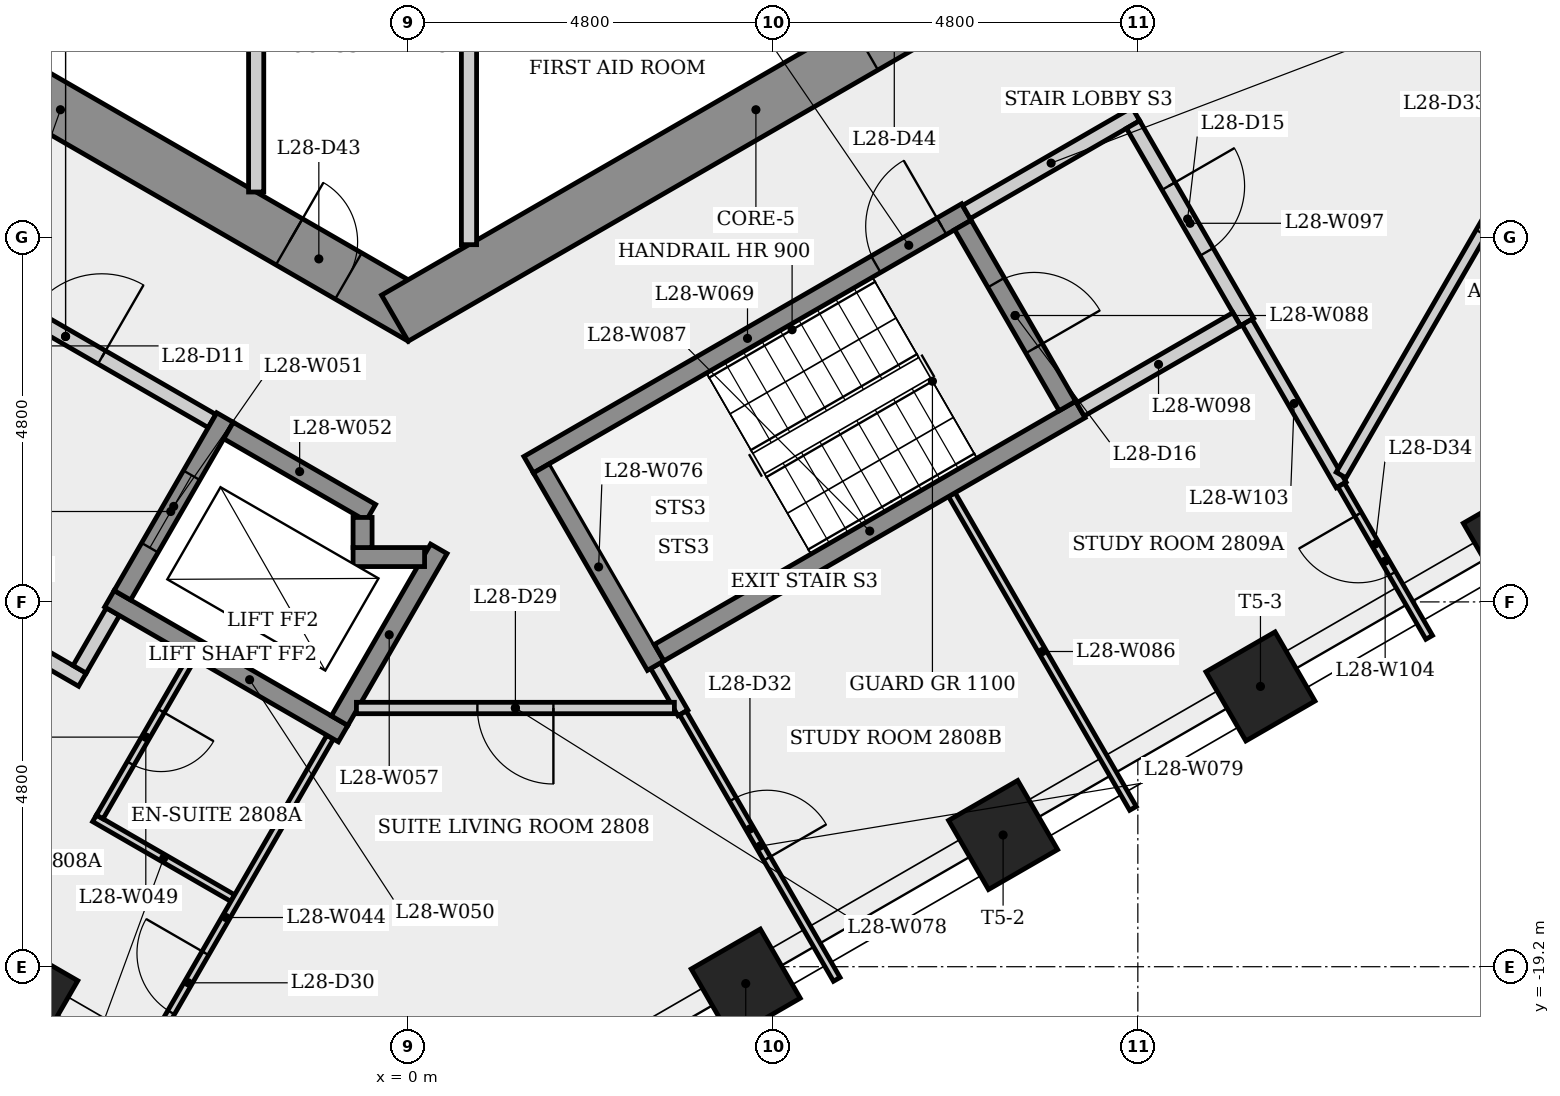
"""IFC4 building model, lengths in metres.
Left out: names, types, materials, properties, quantities, classifications, styles, units other than length and angle.
Written with IfcOpenShell. Run it as: python <this file> out.ifc"""

import sys

from ifc_helpers import new_model, si_unit, direction, frame, frame_2d, origin, origin_2d, place, context, subcontext, project, spatial, rectangle, extrude, element, fill, save


model = new_model("IFC4")
c1 = context("Model", 3, precision=1e-05, world=origin(), true_north=direction((0.0, 1.0)))
c2 = subcontext(c1, "Body", "Model", "MODEL_VIEW")
j1 = project(units=[si_unit("LENGTHUNIT", "METRE"), si_unit("PLANEANGLEUNIT", "RADIAN")], contexts=[c1])
p1 = place(None, origin())
s1 = spatial("IfcSite", under=j1, at=p1, CompositionType="ELEMENT")
p2 = place(p1, origin())
s2 = spatial("IfcBuilding", under=s1, at=p2, CompositionType="ELEMENT")
p3 = place(p2, frame((0.0, 0.0, 106.9)))
s3 = spatial("IfcBuildingStorey", under=s2, at=p3, CompositionType="ELEMENT", Elevation=106.9)
p4 = place(p3, frame((-9.325, -5.182, 0.0), z_axis=(0.0, 0.0, 1.0), x_axis=(0.866023993627, -0.500002442456, 0.0)))
e1 = element("IfcWall", 1, at=p4, inside=s3, PredefinedType="SHEAR", context=c2, shape_type="SweptSolid", body=[
    extrude(rectangle(XDim=10.97, YDim=0.7, at=frame_2d((5.485, 0.0))), origin(), (0.0, 0.0, 1.0), 3.4),
])
p5 = place(p4, frame((2.239, 0.0, 0.0)))
e2 = element("IfcOpeningElement", 2, at=p5, cuts=e1, PredefinedType="OPENING", context=c2, shape_type="SweptSolid", body=[
    extrude(rectangle(XDim=0.9, YDim=2.1, at=frame_2d((0.45, 1.05))), frame((0.0, 0.36, 0.0), z_axis=(0.0, -1.0, 0.0), x_axis=(1.0, 0.0, 0.0)), (0.0, 0.0, 1.0), 0.72),
])
p6 = place(p4, frame((8.96, 0.0, 0.0)))
e3 = element("IfcOpeningElement", 3, at=p6, cuts=e1, PredefinedType="OPENING", context=c2, shape_type="SweptSolid", body=[
    extrude(rectangle(XDim=0.9, YDim=2.1, at=frame_2d((0.45, 1.05))), frame((0.0, 0.36, 0.0), z_axis=(0.0, -1.0, 0.0), x_axis=(1.0, 0.0, 0.0)), (0.0, 0.0, 1.0), 0.72),
])
p7 = place(p3, frame((-0.175, -10.667, 0.0), z_axis=(0.0, 0.0, 1.0), x_axis=(0.866023993627, 0.500002442456, 0.0)))
e4 = element("IfcWall", 4, at=p7, inside=s3, PredefinedType="SHEAR", context=c2, shape_type="SweptSolid", body=[
    extrude(rectangle(XDim=10.97, YDim=0.7, at=frame_2d((5.485, 0.0))), origin(), (0.0, 0.0, 1.0), 3.4),
])
p8 = place(p7, frame((7.137, 0.0, 0.0)))
e5 = element("IfcOpeningElement", 5, at=p8, cuts=e4, PredefinedType="OPENING", context=c2, shape_type="SweptSolid", body=[
    extrude(rectangle(XDim=0.9, YDim=2.1, at=frame_2d((0.45, 1.05))), frame((0.0, 0.36, 0.0), z_axis=(0.0, -1.0, 0.0), x_axis=(1.0, 0.0, 0.0)), (0.0, 0.0, 1.0), 0.72),
])
for number, where, z_axis, x_axis in (
    (6, (-5.064, -19.576, 0.0), (0.0, 0.0, 1.0), (-0.5, -0.866, 0.0)),
    (7, (4.441, -19.422, 0.0), (0.0, 0.0, 1.0), (0.5, -0.866, 0.0)),
    (8, (7.827, -17.467, 0.0), (0.0, 0.0, 1.0), (0.5, -0.866, 0.0)),
    (9, (11.213, -15.512, 0.0), (0.0, 0.0, 1.0), (0.5, -0.866, 0.0)),
    (10, (14.599, -13.557, 0.0), (0.0, 0.0, 1.0), (0.5, -0.866, 0.0)),
):
    element("IfcColumn", number, at=place(p3, frame(where, z_axis=z_axis, x_axis=x_axis)), inside=s3, PredefinedType="COLUMN", context=c2, shape_type="SweptSolid", body=[
        extrude(rectangle(XDim=1.05, YDim=1.05, at=origin_2d()), origin(), (0.0, 0.0, 1.0), 3.4),
    ])
p9 = place(p3, frame((-6.435, -9.795, 0.0), z_axis=(0.0, 0.0, 1.0), x_axis=(0.866012907634, -0.500021643343, 0.0)))
e11 = element("IfcWall", 11, at=p9, inside=s3, PredefinedType="PARTITIONING", context=c2, shape_type="SweptSolid", body=[
    extrude(rectangle(XDim=4.45, YDim=0.2, at=frame_2d((2.225, 0.0))), origin(), (0.0, 0.0, 1.0), 3.05),
])
p10 = place(p9, frame((1.675, 0.0, 0.0)))
e12 = element("IfcOpeningElement", 12, at=p10, cuts=e11, PredefinedType="OPENING", context=c2, shape_type="SweptSolid", body=[
    extrude(rectangle(XDim=1.1, YDim=2.1, at=frame_2d((0.55, 1.05))), frame((0.0, 0.11, 0.0), z_axis=(0.0, -1.0, 0.0), x_axis=(1.0, 0.0, 0.0)), (0.0, 0.0, 1.0), 0.22),
])
p11 = place(p3, frame((-4.286, -15.423, 0.0), z_axis=(0.0, 0.0, 1.0), x_axis=(-0.866025371046, 0.500000056704, 0.0)))
e13 = element("IfcWall", 13, at=p11, inside=s3, PredefinedType="PARTITIONING", context=c2, shape_type="SweptSolid", body=[
    extrude(rectangle(XDim=1.7, YDim=0.2, at=frame_2d((0.85, 0.0))), origin(), (0.0, 0.0, 1.0), 3.05),
])
p12 = place(p3, frame((-4.127, -17.247, 0.0), z_axis=(0.0, 0.0, 1.0), x_axis=(0.866038466041, -0.499977374825, 0.0)))
e14 = element("IfcWall", 14, at=p12, inside=s3, PredefinedType="PARTITIONING", context=c2, shape_type="SweptSolid", body=[
    extrude(rectangle(XDim=2.1, YDim=0.1, at=frame_2d((1.05, 0.0))), origin(), (0.0, 0.0, 1.0), 3.05),
])
p13 = place(p3, frame((-3.885, -14.529, 0.0), z_axis=(0.0, 0.0, 1.0), x_axis=(-0.499859285417, -0.866106630146, 0.0)))
e15 = element("IfcWall", 15, at=p13, inside=s3, PredefinedType="PARTITIONING", context=c2, shape_type="SweptSolid", body=[
    extrude(rectangle(XDim=0.875, YDim=0.2, at=frame_2d((0.438, 0.0))), origin(), (0.0, 0.0, 1.0), 3.05),
])
p14 = place(p3, frame((-3.768, -20.926, 0.0), z_axis=(0.0, 0.0, 1.0), x_axis=(0.499980760091, 0.866036511666, 0.0)))
e16 = element("IfcWall", 16, at=p14, inside=s3, PredefinedType="PARTITIONING", context=c2, shape_type="SweptSolid", body=[
    extrude(rectangle(XDim=5.482, YDim=0.1, at=frame_2d((2.741, 0.0))), origin(), (0.0, 0.0, 1.0), 3.05),
])
p15 = place(p14, frame((1.299, 0.0, 0.0)))
e17 = element("IfcOpeningElement", 17, at=p15, cuts=e16, PredefinedType="OPENING", context=c2, shape_type="SweptSolid", body=[
    extrude(rectangle(XDim=0.9, YDim=2.1, at=frame_2d((0.45, 1.05))), frame((0.0, 0.06, 0.0), z_axis=(0.0, -1.0, 0.0), x_axis=(1.0, 0.0, 0.0)), (0.0, 0.0, 1.0), 0.12),
])
p16 = place(p3, frame((-2.846, -15.129, 0.0), z_axis=(0.0, 0.0, 1.0), x_axis=(-0.500047793048, -0.865997808697, 0.0)))
e18 = element("IfcWall", 18, at=p16, inside=s3, PredefinedType="PARTITIONING", context=c2, shape_type="SweptSolid", body=[
    extrude(rectangle(XDim=2.425, YDim=0.1, at=frame_2d((1.212, 0.0))), origin(), (0.0, 0.0, 1.0), 3.05),
])
p17 = place(p16, frame((0.812, 0.0, 0.0)))
e19 = element("IfcOpeningElement", 19, at=p17, cuts=e18, PredefinedType="OPENING", context=c2, shape_type="SweptSolid", body=[
    extrude(rectangle(XDim=0.8, YDim=2.1, at=frame_2d((0.4, 1.05))), frame((0.0, 0.06, 0.0), z_axis=(0.0, -1.0, 0.0), x_axis=(1.0, 0.0, 0.0)), (0.0, 0.0, 1.0), 0.12),
])
p18 = place(p3, frame((-3.931, -14.358, 0.0), z_axis=(0.0, 0.0, 1.0), x_axis=(0.8660424351, -0.499970499736, 0.0)))
e20 = element("IfcWall", 20, at=p18, inside=s3, PredefinedType="SHEAR", context=c2, shape_type="SweptSolid", body=[
    extrude(rectangle(XDim=3.55, YDim=0.25, at=frame_2d((1.775, 0.0))), origin(), (0.0, 0.0, 1.0), 3.05),
])
p19 = place(p3, frame((-2.41, -11.974, 0.0), z_axis=(0.0, 0.0, 1.0), x_axis=(-0.50000943426, -0.866019956843, 0.0)))
e21 = element("IfcWall", 21, at=p19, inside=s3, PredefinedType="SHEAR", context=c2, shape_type="SweptSolid", body=[
    extrude(rectangle(XDim=2.7, YDim=0.25, at=frame_2d((1.35, 0.0))), origin(), (0.0, 0.0, 1.0), 3.05),
])
p20 = place(p19, frame((0.877, 0.0, 0.0)))
e22 = element("IfcOpeningElement", 22, at=p20, cuts=e21, PredefinedType="OPENING", context=c2, shape_type="SweptSolid", body=[
    extrude(rectangle(XDim=1.1, YDim=2.1, at=frame_2d((0.55, 1.05))), frame((0.0, 0.135, 0.0), z_axis=(0.0, -1.0, 0.0), x_axis=(1.0, 0.0, 0.0)), (0.0, 0.0, 1.0), 0.27),
])
p21 = place(p3, frame((-2.364, -12.145, 0.0), z_axis=(0.0, 0.0, 1.0), x_axis=(0.86603892542, -0.499976579108, 0.0)))
e23 = element("IfcWall", 23, at=p21, inside=s3, PredefinedType="SHEAR", context=c2, shape_type="SweptSolid", body=[
    extrude(rectangle(XDim=2.162, YDim=0.25, at=frame_2d((1.081, 0.0))), origin(), (0.0, 0.0, 1.0), 3.05),
])
p22 = place(p3, frame((-2.0, -5.275, 0.0), z_axis=(0.0, 0.0, 1.0), x_axis=(0.0, -1.0, 0.0)))
e24 = element("IfcWall", 24, at=p22, inside=s3, PredefinedType="PARTITIONING", context=c2, shape_type="SweptSolid", body=[
    extrude(rectangle(XDim=3.732, YDim=0.2, at=frame_2d((1.866, 0.0))), origin(), (0.0, 0.0, 1.0), 3.05),
])
p23 = place(p3, frame((-0.902, -15.962, 0.0), z_axis=(0.0, 0.0, 1.0), x_axis=(0.499981517636, 0.866036074319, 0.0)))
e25 = element("IfcWall", 25, at=p23, inside=s3, PredefinedType="SHEAR", context=c2, shape_type="SweptSolid", body=[
    extrude(rectangle(XDim=2.61, YDim=0.25, at=frame_2d((1.305, 0.0))), origin(), (0.0, 0.0, 1.0), 3.05),
])
p24 = place(p3, frame((-0.725, -13.81, 0.0), z_axis=(0.0, 0.0, 1.0), x_axis=(1.0, 0.0, 0.0)))
e26 = element("IfcWall", 26, at=p24, inside=s3, PredefinedType="SHEAR", context=c2, shape_type="SweptSolid", body=[
    extrude(rectangle(XDim=0.941, YDim=0.25, at=frame_2d((0.47, 0.0))), origin(), (0.0, 0.0, 1.0), 3.4),
])
p25 = place(p3, frame((-0.6, -13.289, 0.0), z_axis=(0.0, 0.0, 1.0), x_axis=(0.0, -1.0, 0.0)))
e27 = element("IfcWall", 27, at=p25, inside=s3, PredefinedType="SHEAR", context=c2, shape_type="SweptSolid", body=[
    extrude(rectangle(XDim=0.396, YDim=0.25, at=frame_2d((0.198, 0.0))), origin(), (0.0, 0.0, 1.0), 3.4),
])
p26 = place(p3, frame((0.8, -5.275, 0.0), z_axis=(0.0, 0.0, 1.0), x_axis=(0.0, -1.0, 0.0)))
e28 = element("IfcWall", 28, at=p26, inside=s3, PredefinedType="PARTITIONING", context=c2, shape_type="SweptSolid", body=[
    extrude(rectangle(XDim=4.425, YDim=0.2, at=frame_2d((2.212, 0.0))), origin(), (0.0, 0.0, 1.0), 3.05),
])
p27 = place(p3, frame((1.585, -12.595, 0.0), z_axis=(0.0, 0.0, 1.0), x_axis=(0.866036417653, 0.499980922934, 0.0)))
e29 = element("IfcWall", 29, at=p27, inside=s3, PredefinedType="SHEAR", context=c2, shape_type="SweptSolid", body=[
    extrude(rectangle(XDim=6.65, YDim=0.25, at=frame_2d((3.325, 0.0))), origin(), (0.0, 0.0, 1.0), 3.05),
])
p28 = place(p27, frame((5.275, 0.0, 0.0)))
e30 = element("IfcOpeningElement", 30, at=p28, cuts=e29, PredefinedType="OPENING", context=c2, shape_type="SweptSolid", body=[
    extrude(rectangle(XDim=1.0, YDim=2.1, at=frame_2d((0.5, 1.05))), frame((0.0, 0.135, 0.0), z_axis=(0.0, -1.0, 0.0), x_axis=(1.0, 0.0, 0.0)), (0.0, 0.0, 1.0), 0.27),
])
p29 = place(p3, frame((3.256, -15.239, 0.0), z_axis=(0.0, 0.0, 1.0), x_axis=(0.499830307316, -0.866123353737, 0.0)))
e31 = element("IfcWall", 31, at=p29, inside=s3, PredefinedType="PARTITIONING", context=c2, shape_type="SweptSolid", body=[
    extrude(rectangle(XDim=0.719, YDim=0.15, at=frame_2d((0.359, 0.0))), origin(), (0.0, 0.0, 1.0), 3.05),
])
p30 = place(p3, frame((3.256, -15.239, 0.0), z_axis=(0.0, 0.0, 1.0), x_axis=(-0.50002537861, 0.866010750942, 0.0)))
e32 = element("IfcWall", 32, at=p30, inside=s3, PredefinedType="SHEAR", context=c2, shape_type="SweptSolid", body=[
    extrude(rectangle(XDim=3.0, YDim=0.25, at=frame_2d((1.5, 0.0))), origin(), (0.0, 0.0, 1.0), 3.05),
])
p31 = place(p3, frame((3.502, -15.796, 0.0), z_axis=(0.0, 0.0, 1.0), x_axis=(-1.0, 0.0, 0.0)))
e33 = element("IfcWall", 33, at=p31, inside=s3, PredefinedType="PARTITIONING", context=c2, shape_type="SweptSolid", body=[
    extrude(rectangle(XDim=4.183, YDim=0.15, at=frame_2d((2.092, 0.0))), origin(), (0.0, 0.0, 1.0), 3.05),
])
p32 = place(p31, frame((1.592, 0.0, 0.0)))
e34 = element("IfcOpeningElement", 34, at=p32, cuts=e33, PredefinedType="OPENING", context=c2, shape_type="SweptSolid", body=[
    extrude(rectangle(XDim=1.0, YDim=2.1, at=frame_2d((0.5, 1.05))), frame((0.0, 0.085, 0.0), z_axis=(0.0, -1.0, 0.0), x_axis=(1.0, 0.0, 0.0)), (0.0, 0.0, 1.0), 0.17),
])
p33 = place(p3, frame((3.615, -15.861, 0.0), z_axis=(0.0, 0.0, 1.0), x_axis=(0.500018313359, -0.866014830303, 0.0)))
e35 = element("IfcWall", 35, at=p33, inside=s3, PredefinedType="PARTITIONING", context=c2, shape_type="SweptSolid", body=[
    extrude(rectangle(XDim=4.048, YDim=0.1, at=frame_2d((2.024, 0.0))), origin(), (0.0, 0.0, 1.0), 3.05),
])
p34 = place(p33, frame((1.313, 0.0, 0.0)))
e36 = element("IfcOpeningElement", 36, at=p34, cuts=e35, PredefinedType="OPENING", context=c2, shape_type="SweptSolid", body=[
    extrude(rectangle(XDim=0.9, YDim=2.1, at=frame_2d((0.45, 1.05))), frame((0.0, 0.06, 0.0), z_axis=(0.0, -1.0, 0.0), x_axis=(1.0, 0.0, 0.0)), (0.0, 0.0, 1.0), 0.12),
])
p35 = place(p3, frame((7.153, -12.989, 0.0), z_axis=(0.0, 0.0, 1.0), x_axis=(0.500028389435, -0.866009012516, 0.0)))
e37 = element("IfcWall", 37, at=p35, inside=s3, PredefinedType="PARTITIONING", context=c2, shape_type="SweptSolid", body=[
    extrude(rectangle(XDim=4.766, YDim=0.1, at=frame_2d((2.383, 0.0))), origin(), (0.0, 0.0, 1.0), 3.05),
])
p36 = place(p3, frame((3.301, -15.068, 0.0), z_axis=(0.0, 0.0, 1.0), x_axis=(0.866035036182, 0.499983315828, 0.0)))
e38 = element("IfcWall", 38, at=p36, inside=s3, PredefinedType="SHEAR", context=c2, shape_type="SweptSolid", body=[
    extrude(rectangle(XDim=6.4, YDim=0.25, at=frame_2d((3.2, 0.0))), origin(), (0.0, 0.0, 1.0), 3.05),
])
p37 = place(p3, frame((7.298, -9.441, 0.0), z_axis=(0.0, 0.0, 1.0), x_axis=(0.500034990121, -0.866005201286, 0.0)))
e39 = element("IfcWall", 39, at=p37, inside=s3, PredefinedType="SHEAR", context=c2, shape_type="SweptSolid", body=[
    extrude(rectangle(XDim=2.75, YDim=0.25, at=frame_2d((1.375, 0.0))), origin(), (0.0, 0.0, 1.0), 3.05),
])
p38 = place(p37, frame((0.875, 0.0, 0.0)))
e40 = element("IfcOpeningElement", 40, at=p38, cuts=e39, PredefinedType="OPENING", context=c2, shape_type="SweptSolid", body=[
    extrude(rectangle(XDim=1.0, YDim=2.1, at=frame_2d((0.5, 1.05))), frame((0.0, 0.135, 0.0), z_axis=(0.0, -1.0, 0.0), x_axis=(1.0, 0.0, 0.0)), (0.0, 0.0, 1.0), 0.27),
])
p39 = place(p3, frame((7.344, -9.27, 0.0), z_axis=(0.0, 0.0, 1.0), x_axis=(0.866005588531, 0.500034319456, 0.0)))
e41 = element("IfcWall", 41, at=p39, inside=s3, PredefinedType="PARTITIONING", context=c2, shape_type="SweptSolid", body=[
    extrude(rectangle(XDim=2.575, YDim=0.2, at=frame_2d((1.288, 0.0))), origin(), (0.0, 0.0, 1.0), 3.05),
])
p40 = place(p3, frame((9.537, -8.119, 0.0), z_axis=(0.0, 0.0, 1.0), x_axis=(0.499990139034, -0.866031096941, 0.0)))
e42 = element("IfcWall", 42, at=p40, inside=s3, PredefinedType="PARTITIONING", context=c2, shape_type="SweptSolid", body=[
    extrude(rectangle(XDim=3.0, YDim=0.2, at=frame_2d((1.5, 0.0))), origin(), (0.0, 0.0, 1.0), 3.05),
])
p41 = place(p40, frame((0.935, 0.0, 0.0)))
e43 = element("IfcOpeningElement", 43, at=p41, cuts=e42, PredefinedType="OPENING", context=c2, shape_type="SweptSolid", body=[
    extrude(rectangle(XDim=1.0, YDim=2.1, at=frame_2d((0.5, 1.05))), frame((0.0, 0.11, 0.0), z_axis=(0.0, -1.0, 0.0), x_axis=(1.0, 0.0, 0.0)), (0.0, 0.0, 1.0), 0.22),
])
p42 = place(p3, frame((10.901, -10.681, 0.0), z_axis=(0.0, 0.0, 1.0), x_axis=(-0.866007538022, -0.500030943131, 0.0)))
e44 = element("IfcWall", 44, at=p42, inside=s3, PredefinedType="PARTITIONING", context=c2, shape_type="SweptSolid", body=[
    extrude(rectangle(XDim=2.375, YDim=0.2, at=frame_2d((1.188, 0.0))), origin(), (0.0, 0.0, 1.0), 3.05),
])
p43 = place(p3, frame((12.275, -12.861, 0.0), z_axis=(0.0, 0.0, 1.0), x_axis=(-0.499904577418, 0.866080489029, 0.0)))
e45 = element("IfcWall", 45, at=p43, inside=s3, PredefinedType="PARTITIONING", context=c2, shape_type="SweptSolid", body=[
    extrude(rectangle(XDim=2.476, YDim=0.15, at=frame_2d((1.238, 0.0))), origin(), (0.0, 0.0, 1.0), 3.05),
])
p44 = place(p3, frame((13.433, -14.866, 0.0), z_axis=(0.0, 0.0, 1.0), x_axis=(-0.500050991752, 0.865995961681, 0.0)))
e46 = element("IfcWall", 46, at=p44, inside=s3, PredefinedType="PARTITIONING", context=c2, shape_type="SweptSolid", body=[
    extrude(rectangle(XDim=2.316, YDim=0.1, at=frame_2d((1.158, 0.0))), origin(), (0.0, 0.0, 1.0), 3.05),
])
p45 = place(p44, frame((0.968, 0.0, 0.0)))
e47 = element("IfcOpeningElement", 47, at=p45, cuts=e46, PredefinedType="OPENING", context=c2, shape_type="SweptSolid", body=[
    extrude(rectangle(XDim=0.9, YDim=2.1, at=frame_2d((0.45, 1.05))), frame((0.0, 0.06, 0.0), z_axis=(0.0, -1.0, 0.0), x_axis=(1.0, 0.0, 0.0)), (0.0, 0.0, 1.0), 0.12),
])
p46 = place(p3, frame((16.457, -5.488, 0.0), z_axis=(0.0, 0.0, 1.0), x_axis=(-0.499991130599, -0.866030524475, 0.0)))
e48 = element("IfcWall", 48, at=p46, inside=s3, PredefinedType="PARTITIONING", context=c2, shape_type="SweptSolid", body=[
    extrude(rectangle(XDim=8.364, YDim=0.15, at=frame_2d((4.182, 0.0))), origin(), (0.0, 0.0, 1.0), 3.05),
])
p47 = place(p46, frame((3.682, 0.0, 0.0)))
e49 = element("IfcOpeningElement", 49, at=p47, cuts=e48, PredefinedType="OPENING", context=c2, shape_type="SweptSolid", body=[
    extrude(rectangle(XDim=1.0, YDim=2.1, at=frame_2d((0.5, 1.05))), frame((0.0, 0.085, 0.0), z_axis=(0.0, -1.0, 0.0), x_axis=(1.0, 0.0, 0.0)), (0.0, 0.0, 1.0), 0.17),
])
p48 = place(p10, origin())
e50 = element("IfcDoor", 50, at=p48, inside=s3, OperationType="SINGLE_SWING_RIGHT", PredefinedType="DOOR", context=c2, shape_type="SweptSolid", body=[
    extrude(rectangle(XDim=1.1, YDim=2.1, at=frame_2d((0.55, 1.05))), frame((0.0, 0.025, 0.0), z_axis=(0.0, -1.0, 0.0), x_axis=(1.0, 0.0, 0.0)), (0.0, 0.0, 1.0), 0.05),
])
fill(e12, e50)
p49 = place(p20, origin())
e51 = element("IfcDoor", 51, at=p49, inside=s3, OperationType="SLIDING_TO_LEFT", PredefinedType="DOOR", context=c2, shape_type="SweptSolid", body=[
    extrude(rectangle(XDim=1.1, YDim=2.1, at=frame_2d((0.55, 1.05))), frame((0.0, 0.025, 0.0), z_axis=(0.0, -1.0, 0.0), x_axis=(1.0, 0.0, 0.0)), (0.0, 0.0, 1.0), 0.05),
])
fill(e22, e51)
p50 = place(p28, origin())
e52 = element("IfcDoor", 52, at=p50, inside=s3, OperationType="SINGLE_SWING_RIGHT", PredefinedType="DOOR", context=c2, shape_type="SweptSolid", body=[
    extrude(rectangle(XDim=1.0, YDim=2.1, at=frame_2d((0.5, 1.05))), frame((0.0, 0.025, 0.0), z_axis=(0.0, -1.0, 0.0), x_axis=(1.0, 0.0, 0.0)), (0.0, 0.0, 1.0), 0.05),
])
fill(e30, e52)
p51 = place(p41, origin())
e53 = element("IfcDoor", 53, at=p51, inside=s3, OperationType="SINGLE_SWING_LEFT", PredefinedType="DOOR", context=c2, shape_type="SweptSolid", body=[
    extrude(rectangle(XDim=1.0, YDim=2.1, at=frame_2d((0.5, 1.05))), frame((0.0, 0.025, 0.0), z_axis=(0.0, -1.0, 0.0), x_axis=(1.0, 0.0, 0.0)), (0.0, 0.0, 1.0), 0.05),
])
fill(e43, e53)
p52 = place(p38, origin())
e54 = element("IfcDoor", 54, at=p52, inside=s3, OperationType="SINGLE_SWING_RIGHT", PredefinedType="DOOR", context=c2, shape_type="SweptSolid", body=[
    extrude(rectangle(XDim=1.0, YDim=2.1, at=frame_2d((0.5, 1.05))), frame((0.0, 0.025, 0.0), z_axis=(0.0, -1.0, 0.0), x_axis=(1.0, 0.0, 0.0)), (0.0, 0.0, 1.0), 0.05),
])
fill(e40, e54)
p53 = place(p32, origin())
e55 = element("IfcDoor", 55, at=p53, inside=s3, OperationType="SINGLE_SWING_LEFT", PredefinedType="DOOR", context=c2, shape_type="SweptSolid", body=[
    extrude(rectangle(XDim=1.0, YDim=2.1, at=frame_2d((0.5, 1.05))), frame((0.0, 0.025, 0.0), z_axis=(0.0, -1.0, 0.0), x_axis=(1.0, 0.0, 0.0)), (0.0, 0.0, 1.0), 0.05),
])
fill(e34, e55)
p54 = place(p15, origin())
e56 = element("IfcDoor", 56, at=p54, inside=s3, OperationType="SINGLE_SWING_RIGHT", PredefinedType="DOOR", context=c2, shape_type="SweptSolid", body=[
    extrude(rectangle(XDim=0.9, YDim=2.1, at=frame_2d((0.45, 1.05))), frame((0.0, 0.025, 0.0), z_axis=(0.0, -1.0, 0.0), x_axis=(1.0, 0.0, 0.0)), (0.0, 0.0, 1.0), 0.05),
])
fill(e17, e56)
p55 = place(p17, origin())
e57 = element("IfcDoor", 57, at=p55, inside=s3, OperationType="SINGLE_SWING_LEFT", PredefinedType="DOOR", context=c2, shape_type="SweptSolid", body=[
    extrude(rectangle(XDim=0.8, YDim=2.1, at=frame_2d((0.4, 1.05))), frame((0.0, 0.025, 0.0), z_axis=(0.0, -1.0, 0.0), x_axis=(1.0, 0.0, 0.0)), (0.0, 0.0, 1.0), 0.05),
])
fill(e19, e57)
p56 = place(p34, origin())
e58 = element("IfcDoor", 58, at=p56, inside=s3, OperationType="SINGLE_SWING_RIGHT", PredefinedType="DOOR", context=c2, shape_type="SweptSolid", body=[
    extrude(rectangle(XDim=0.9, YDim=2.1, at=frame_2d((0.45, 1.05))), frame((0.0, 0.025, 0.0), z_axis=(0.0, -1.0, 0.0), x_axis=(1.0, 0.0, 0.0)), (0.0, 0.0, 1.0), 0.05),
])
fill(e36, e58)
p57 = place(p47, origin())
e59 = element("IfcDoor", 59, at=p57, inside=s3, OperationType="SINGLE_SWING_LEFT", PredefinedType="DOOR", context=c2, shape_type="SweptSolid", body=[
    extrude(rectangle(XDim=1.0, YDim=2.1, at=frame_2d((0.5, 1.05))), frame((0.0, 0.025, 0.0), z_axis=(0.0, -1.0, 0.0), x_axis=(1.0, 0.0, 0.0)), (0.0, 0.0, 1.0), 0.05),
])
fill(e49, e59)
p58 = place(p45, origin())
e60 = element("IfcDoor", 60, at=p58, inside=s3, OperationType="SINGLE_SWING_RIGHT", PredefinedType="DOOR", context=c2, shape_type="SweptSolid", body=[
    extrude(rectangle(XDim=0.9, YDim=2.1, at=frame_2d((0.45, 1.05))), frame((0.0, 0.025, 0.0), z_axis=(0.0, -1.0, 0.0), x_axis=(1.0, 0.0, 0.0)), (0.0, 0.0, 1.0), 0.05),
])
fill(e47, e60)
p59 = place(p6, origin())
e61 = element("IfcDoor", 61, at=p59, inside=s3, OperationType="SINGLE_SWING_LEFT", PredefinedType="DOOR", context=c2, shape_type="SweptSolid", body=[
    extrude(rectangle(XDim=0.9, YDim=2.1, at=frame_2d((0.45, 1.05))), frame((0.0, 0.025, 0.0), z_axis=(0.0, -1.0, 0.0), x_axis=(1.0, 0.0, 0.0)), (0.0, 0.0, 1.0), 0.05),
])
fill(e3, e61)
save(model, sys.argv[1])
